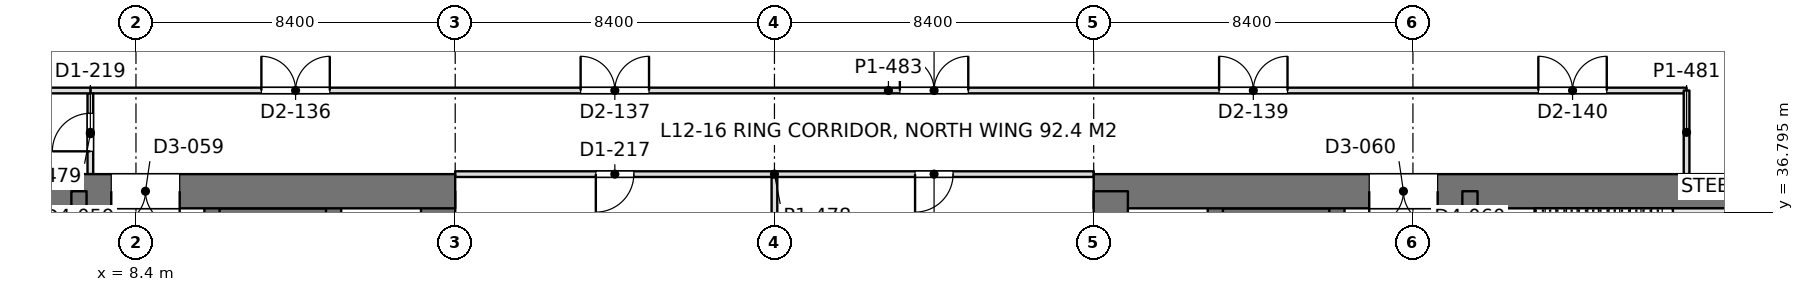
"""IFC4 building model, lengths in metres.
Left out: names, types, materials, properties, quantities, classifications, styles, units other than length and angle.
Written with IfcOpenShell. Run it as: python <this file> out.ifc"""

import sys

from ifc_helpers import new_model, si_unit, direction, frame, frame_2d, origin, place, context, subcontext, project, spatial, rectangle, extrude, element, fill, save


model = new_model("IFC4")
c1 = context("Model", 3, precision=1e-05, world=origin(), true_north=direction((0.0, 1.0)))
c2 = subcontext(c1, "Body", "Model", "MODEL_VIEW")
j1 = project(units=[si_unit("LENGTHUNIT", "METRE"), si_unit("PLANEANGLEUNIT", "RADIAN")], contexts=[c1])
p1 = place(None, origin())
s1 = spatial("IfcSite", under=j1, at=p1, CompositionType="ELEMENT")
p2 = place(p1, origin())
s2 = spatial("IfcBuilding", under=s1, at=p2, CompositionType="ELEMENT")
p3 = place(p2, frame((0.0, 0.0, 54.9)))
s3 = spatial("IfcBuildingStorey", under=s2, at=p3, CompositionType="ELEMENT", Elevation=54.9)
p4 = place(p3, frame((-1.2, 37.35, 0.0), z_axis=(0.0, 0.0, 1.0), x_axis=(1.0, 0.0, 0.0)))
e1 = element("IfcWall", 1, at=p4, inside=s3, PredefinedType="SHEAR", context=c2, shape_type="SweptSolid", body=[
    extrude(rectangle(XDim=18.0, YDim=0.9, at=frame_2d((9.0, 0.0))), origin(), (0.0, 0.0, 1.0), 4.5),
])
p5 = place(p4, frame((8.95, 0.0, 0.0)))
e2 = element("IfcOpeningElement", 2, at=p5, cuts=e1, PredefinedType="OPENING", context=c2, shape_type="SweptSolid", body=[
    extrude(rectangle(XDim=1.8, YDim=2.4, at=frame_2d((0.9, 1.2))), frame((0.0, 0.46, 0.0), z_axis=(0.0, -1.0, 0.0), x_axis=(1.0, 0.0, 0.0)), (0.0, 0.0, 1.0), 0.92),
])
p6 = place(p3, frame((16.35, 13.05, 0.0), z_axis=(0.0, 0.0, 1.0), x_axis=(0.0, 1.0, 0.0)))
e3 = element("IfcWall", 3, at=p6, inside=s3, PredefinedType="SHEAR", context=c2, shape_type="SweptSolid", body=[
    extrude(rectangle(XDim=24.3, YDim=0.9, at=frame_2d((12.15, 0.0))), origin(), (0.0, 0.0, 1.0), 4.5),
])
p7 = place(p3, frame((6.9, 13.05, 0.0), z_axis=(0.0, 0.0, 1.0), x_axis=(0.0, 1.0, 0.0)))
e4 = element("IfcWall", 4, at=p7, inside=s3, PredefinedType="SHEAR", context=c2, shape_type="SweptSolid", body=[
    extrude(rectangle(XDim=24.3, YDim=0.4, at=frame_2d((12.15, 0.0))), origin(), (0.0, 0.0, 1.0), 4.5),
])
p8 = place(p7, frame((1.3, 0.0, 0.0)))
e5 = element("IfcOpeningElement", 5, at=p8, cuts=e4, PredefinedType="OPENING", context=c2, shape_type="SweptSolid", body=[
    extrude(rectangle(XDim=1.0, YDim=2.2, at=frame_2d((0.5, 1.1))), frame((0.0, 0.21, 0.0), z_axis=(0.0, -1.0, 0.0), x_axis=(1.0, 0.0, 0.0)), (0.0, 0.0, 1.0), 0.42),
])
p9 = place(p7, frame((22.0, 0.0, 0.0)))
e6 = element("IfcOpeningElement", 6, at=p9, cuts=e4, PredefinedType="OPENING", context=c2, shape_type="SweptSolid", body=[
    extrude(rectangle(XDim=1.0, YDim=2.2, at=frame_2d((0.5, 1.1))), frame((0.0, 0.21, 0.0), z_axis=(0.0, -1.0, 0.0), x_axis=(1.0, 0.0, 0.0)), (0.0, 0.0, 1.0), 0.42),
])
p10 = place(p7, frame((5.55, 0.0, 0.0)))
e7 = element("IfcOpeningElement", 7, at=p10, cuts=e4, PredefinedType="OPENING", context=c2, shape_type="SweptSolid", body=[
    extrude(rectangle(XDim=1.0, YDim=2.2, at=frame_2d((0.5, 1.1))), frame((0.0, 0.21, 0.0), z_axis=(0.0, -1.0, 0.0), x_axis=(1.0, 0.0, 0.0)), (0.0, 0.0, 1.0), 0.42),
])
p11 = place(p7, frame((9.55, 0.0, 0.0)))
e8 = element("IfcOpeningElement", 8, at=p11, cuts=e4, PredefinedType="OPENING", context=c2, shape_type="SweptSolid", body=[
    extrude(rectangle(XDim=1.0, YDim=2.2, at=frame_2d((0.5, 1.1))), frame((0.0, 0.21, 0.0), z_axis=(0.0, -1.0, 0.0), x_axis=(1.0, 0.0, 0.0)), (0.0, 0.0, 1.0), 0.42),
])
p12 = place(p7, frame((12.8, 0.0, 0.0)))
e9 = element("IfcOpeningElement", 9, at=p12, cuts=e4, PredefinedType="OPENING", context=c2, shape_type="SweptSolid", body=[
    extrude(rectangle(XDim=1.1, YDim=2.2, at=frame_2d((0.55, 1.1))), frame((0.0, 0.21, 0.0), z_axis=(0.0, -1.0, 0.0), x_axis=(1.0, 0.0, 0.0)), (0.0, 0.0, 1.0), 0.42),
])
p13 = place(p7, frame((15.538, 0.0, 0.0)))
e10 = element("IfcOpeningElement", 10, at=p13, cuts=e4, PredefinedType="OPENING", context=c2, shape_type="SweptSolid", body=[
    extrude(rectangle(XDim=1.1, YDim=2.2, at=frame_2d((0.55, 1.1))), frame((0.0, 0.21, 0.0), z_axis=(0.0, -1.0, 0.0), x_axis=(1.0, 0.0, 0.0)), (0.0, 0.0, 1.0), 0.42),
])
p14 = place(p7, frame((18.262, 0.0, 0.0)))
e11 = element("IfcOpeningElement", 11, at=p14, cuts=e4, PredefinedType="OPENING", context=c2, shape_type="SweptSolid", body=[
    extrude(rectangle(XDim=1.1, YDim=2.2, at=frame_2d((0.55, 1.1))), frame((0.0, 0.21, 0.0), z_axis=(0.0, -1.0, 0.0), x_axis=(1.0, 0.0, 0.0)), (0.0, 0.0, 1.0), 0.42),
])
p15 = place(p3, frame((10.4, 13.05, 0.0), z_axis=(0.0, 0.0, 1.0), x_axis=(0.0, 1.0, 0.0)))
e12 = element("IfcWall", 12, at=p15, inside=s3, PredefinedType="SHEAR", context=c2, shape_type="SweptSolid", body=[
    extrude(rectangle(XDim=24.3, YDim=0.4, at=frame_2d((12.15, 0.0))), origin(), (0.0, 0.0, 1.0), 4.5),
])
p16 = place(p15, frame((1.5, 0.0, 0.0)))
e13 = element("IfcOpeningElement", 13, at=p16, cuts=e12, PredefinedType="OPENING", context=c2, shape_type="SweptSolid", body=[
    extrude(rectangle(XDim=1.1, YDim=2.2, at=frame_2d((0.55, 1.1))), frame((0.0, 0.21, 0.0), z_axis=(0.0, -1.0, 0.0), x_axis=(1.0, 0.0, 0.0)), (0.0, 0.0, 1.0), 0.42),
])
p17 = place(p15, frame((4.35, 0.0, 0.0)))
e14 = element("IfcOpeningElement", 14, at=p17, cuts=e12, PredefinedType="OPENING", context=c2, shape_type="SweptSolid", body=[
    extrude(rectangle(XDim=1.1, YDim=2.2, at=frame_2d((0.55, 1.1))), frame((0.0, 0.21, 0.0), z_axis=(0.0, -1.0, 0.0), x_axis=(1.0, 0.0, 0.0)), (0.0, 0.0, 1.0), 0.42),
])
p18 = place(p15, frame((7.2, 0.0, 0.0)))
e15 = element("IfcOpeningElement", 15, at=p18, cuts=e12, PredefinedType="OPENING", context=c2, shape_type="SweptSolid", body=[
    extrude(rectangle(XDim=1.1, YDim=2.2, at=frame_2d((0.55, 1.1))), frame((0.0, 0.21, 0.0), z_axis=(0.0, -1.0, 0.0), x_axis=(1.0, 0.0, 0.0)), (0.0, 0.0, 1.0), 0.42),
])
p19 = place(p15, frame((21.45, 0.0, 0.0)))
e16 = element("IfcOpeningElement", 16, at=p19, cuts=e12, PredefinedType="OPENING", context=c2, shape_type="SweptSolid", body=[
    extrude(rectangle(XDim=1.1, YDim=2.2, at=frame_2d((0.55, 1.1))), frame((0.0, 0.21, 0.0), z_axis=(0.0, -1.0, 0.0), x_axis=(1.0, 0.0, 0.0)), (0.0, 0.0, 1.0), 0.42),
])
p20 = place(p3, frame((13.6, 13.05, 0.0), z_axis=(0.0, 0.0, 1.0), x_axis=(0.0, 1.0, 0.0)))
e17 = element("IfcWall", 17, at=p20, inside=s3, PredefinedType="SHEAR", context=c2, shape_type="SweptSolid", body=[
    extrude(rectangle(XDim=24.3, YDim=0.4, at=frame_2d((12.15, 0.0))), origin(), (0.0, 0.0, 1.0), 4.5),
])
p21 = place(p3, frame((10.4, 36.625, 0.0), z_axis=(0.0, 0.0, 1.0), x_axis=(1.0, 0.0, 0.0)))
e18 = element("IfcWall", 18, at=p21, inside=s3, PredefinedType="SHEAR", context=c2, shape_type="SweptSolid", body=[
    extrude(rectangle(XDim=3.2, YDim=0.55, at=frame_2d((1.6, 0.0))), origin(), (0.0, 0.0, 1.0), 4.5),
])
p22 = place(p3, frame((33.6, 37.35, 0.0), z_axis=(0.0, 0.0, 1.0), x_axis=(1.0, 0.0, 0.0)))
e19 = element("IfcWall", 19, at=p22, inside=s3, PredefinedType="SHEAR", context=c2, shape_type="SweptSolid", body=[
    extrude(rectangle(XDim=18.0, YDim=0.9, at=frame_2d((9.0, 0.0))), origin(), (0.0, 0.0, 1.0), 4.5),
])
p23 = place(p22, frame((7.25, 0.0, 0.0)))
e20 = element("IfcOpeningElement", 20, at=p23, cuts=e19, PredefinedType="OPENING", context=c2, shape_type="SweptSolid", body=[
    extrude(rectangle(XDim=1.8, YDim=2.4, at=frame_2d((0.9, 1.2))), frame((0.0, 0.46, 0.0), z_axis=(0.0, -1.0, 0.0), x_axis=(1.0, 0.0, 0.0)), (0.0, 0.0, 1.0), 0.92),
])
p24 = place(p3, frame((34.05, 13.05, 0.0), z_axis=(0.0, 0.0, 1.0), x_axis=(0.0, 1.0, 0.0)))
e21 = element("IfcWall", 21, at=p24, inside=s3, PredefinedType="SHEAR", context=c2, shape_type="SweptSolid", body=[
    extrude(rectangle(XDim=24.3, YDim=0.9, at=frame_2d((12.15, 0.0))), origin(), (0.0, 0.0, 1.0), 4.5),
])
p25 = place(p3, frame((43.5, 13.05, 0.0), z_axis=(0.0, 0.0, 1.0), x_axis=(0.0, 1.0, 0.0)))
e22 = element("IfcWall", 22, at=p25, inside=s3, PredefinedType="SHEAR", context=c2, shape_type="SweptSolid", body=[
    extrude(rectangle(XDim=24.3, YDim=0.4, at=frame_2d((12.15, 0.0))), origin(), (0.0, 0.0, 1.0), 4.5),
])
p26 = place(p25, frame((1.3, 0.0, 0.0)))
e23 = element("IfcOpeningElement", 23, at=p26, cuts=e22, PredefinedType="OPENING", context=c2, shape_type="SweptSolid", body=[
    extrude(rectangle(XDim=1.0, YDim=2.2, at=frame_2d((0.5, 1.1))), frame((0.0, 0.21, 0.0), z_axis=(0.0, -1.0, 0.0), x_axis=(1.0, 0.0, 0.0)), (0.0, 0.0, 1.0), 0.42),
])
p27 = place(p25, frame((22.0, 0.0, 0.0)))
e24 = element("IfcOpeningElement", 24, at=p27, cuts=e22, PredefinedType="OPENING", context=c2, shape_type="SweptSolid", body=[
    extrude(rectangle(XDim=1.0, YDim=2.2, at=frame_2d((0.5, 1.1))), frame((0.0, 0.21, 0.0), z_axis=(0.0, -1.0, 0.0), x_axis=(1.0, 0.0, 0.0)), (0.0, 0.0, 1.0), 0.42),
])
p28 = place(p25, frame((5.55, 0.0, 0.0)))
e25 = element("IfcOpeningElement", 25, at=p28, cuts=e22, PredefinedType="OPENING", context=c2, shape_type="SweptSolid", body=[
    extrude(rectangle(XDim=1.0, YDim=2.2, at=frame_2d((0.5, 1.1))), frame((0.0, 0.21, 0.0), z_axis=(0.0, -1.0, 0.0), x_axis=(1.0, 0.0, 0.0)), (0.0, 0.0, 1.0), 0.42),
])
p29 = place(p25, frame((9.55, 0.0, 0.0)))
e26 = element("IfcOpeningElement", 26, at=p29, cuts=e22, PredefinedType="OPENING", context=c2, shape_type="SweptSolid", body=[
    extrude(rectangle(XDim=1.0, YDim=2.2, at=frame_2d((0.5, 1.1))), frame((0.0, 0.21, 0.0), z_axis=(0.0, -1.0, 0.0), x_axis=(1.0, 0.0, 0.0)), (0.0, 0.0, 1.0), 0.42),
])
p30 = place(p25, frame((12.8, 0.0, 0.0)))
e27 = element("IfcOpeningElement", 27, at=p30, cuts=e22, PredefinedType="OPENING", context=c2, shape_type="SweptSolid", body=[
    extrude(rectangle(XDim=1.1, YDim=2.2, at=frame_2d((0.55, 1.1))), frame((0.0, 0.21, 0.0), z_axis=(0.0, -1.0, 0.0), x_axis=(1.0, 0.0, 0.0)), (0.0, 0.0, 1.0), 0.42),
])
p31 = place(p25, frame((15.538, 0.0, 0.0)))
e28 = element("IfcOpeningElement", 28, at=p31, cuts=e22, PredefinedType="OPENING", context=c2, shape_type="SweptSolid", body=[
    extrude(rectangle(XDim=1.1, YDim=2.2, at=frame_2d((0.55, 1.1))), frame((0.0, 0.21, 0.0), z_axis=(0.0, -1.0, 0.0), x_axis=(1.0, 0.0, 0.0)), (0.0, 0.0, 1.0), 0.42),
])
p32 = place(p25, frame((18.262, 0.0, 0.0)))
e29 = element("IfcOpeningElement", 29, at=p32, cuts=e22, PredefinedType="OPENING", context=c2, shape_type="SweptSolid", body=[
    extrude(rectangle(XDim=1.1, YDim=2.2, at=frame_2d((0.55, 1.1))), frame((0.0, 0.21, 0.0), z_axis=(0.0, -1.0, 0.0), x_axis=(1.0, 0.0, 0.0)), (0.0, 0.0, 1.0), 0.42),
])
p33 = place(p3, frame((40.0, 13.05, 0.0), z_axis=(0.0, 0.0, 1.0), x_axis=(0.0, 1.0, 0.0)))
e30 = element("IfcWall", 30, at=p33, inside=s3, PredefinedType="SHEAR", context=c2, shape_type="SweptSolid", body=[
    extrude(rectangle(XDim=24.3, YDim=0.4, at=frame_2d((12.15, 0.0))), origin(), (0.0, 0.0, 1.0), 4.5),
])
p34 = place(p33, frame((1.5, 0.0, 0.0)))
e31 = element("IfcOpeningElement", 31, at=p34, cuts=e30, PredefinedType="OPENING", context=c2, shape_type="SweptSolid", body=[
    extrude(rectangle(XDim=1.1, YDim=2.2, at=frame_2d((0.55, 1.1))), frame((0.0, 0.21, 0.0), z_axis=(0.0, -1.0, 0.0), x_axis=(1.0, 0.0, 0.0)), (0.0, 0.0, 1.0), 0.42),
])
p35 = place(p33, frame((4.35, 0.0, 0.0)))
e32 = element("IfcOpeningElement", 32, at=p35, cuts=e30, PredefinedType="OPENING", context=c2, shape_type="SweptSolid", body=[
    extrude(rectangle(XDim=1.1, YDim=2.2, at=frame_2d((0.55, 1.1))), frame((0.0, 0.21, 0.0), z_axis=(0.0, -1.0, 0.0), x_axis=(1.0, 0.0, 0.0)), (0.0, 0.0, 1.0), 0.42),
])
p36 = place(p33, frame((7.2, 0.0, 0.0)))
e33 = element("IfcOpeningElement", 33, at=p36, cuts=e30, PredefinedType="OPENING", context=c2, shape_type="SweptSolid", body=[
    extrude(rectangle(XDim=1.1, YDim=2.2, at=frame_2d((0.55, 1.1))), frame((0.0, 0.21, 0.0), z_axis=(0.0, -1.0, 0.0), x_axis=(1.0, 0.0, 0.0)), (0.0, 0.0, 1.0), 0.42),
])
p37 = place(p33, frame((21.45, 0.0, 0.0)))
e34 = element("IfcOpeningElement", 34, at=p37, cuts=e30, PredefinedType="OPENING", context=c2, shape_type="SweptSolid", body=[
    extrude(rectangle(XDim=1.1, YDim=2.2, at=frame_2d((0.55, 1.1))), frame((0.0, 0.21, 0.0), z_axis=(0.0, -1.0, 0.0), x_axis=(1.0, 0.0, 0.0)), (0.0, 0.0, 1.0), 0.42),
])
p38 = place(p3, frame((36.8, 13.05, 0.0), z_axis=(0.0, 0.0, 1.0), x_axis=(0.0, 1.0, 0.0)))
e35 = element("IfcWall", 35, at=p38, inside=s3, PredefinedType="SHEAR", context=c2, shape_type="SweptSolid", body=[
    extrude(rectangle(XDim=24.3, YDim=0.4, at=frame_2d((12.15, 0.0))), origin(), (0.0, 0.0, 1.0), 4.5),
])
p39 = place(p3, frame((40.0, 36.625, 0.0), z_axis=(0.0, 0.0, 1.0), x_axis=(-1.0, 0.0, 0.0)))
e36 = element("IfcWall", 36, at=p39, inside=s3, PredefinedType="SHEAR", context=c2, shape_type="SweptSolid", body=[
    extrude(rectangle(XDim=3.2, YDim=0.55, at=frame_2d((1.6, 0.0))), origin(), (0.0, 0.0, 1.0), 4.5),
])
p40 = place(p3, frame((7.198, 40.0, 0.0), z_axis=(0.0, 0.0, 1.0), x_axis=(1.0, 0.0, 0.0)))
e37 = element("IfcWall", 37, at=p40, inside=s3, PredefinedType="PARTITIONING", context=c2, shape_type="SweptSolid", body=[
    extrude(rectangle(XDim=42.002, YDim=0.15, at=frame_2d((21.001, 0.0))), origin(), (0.0, 0.0, 1.0), 3.74),
])
p41 = place(p40, frame((4.502, 0.0, 0.0)))
e38 = element("IfcOpeningElement", 38, at=p41, cuts=e37, PredefinedType="OPENING", context=c2, shape_type="SweptSolid", body=[
    extrude(rectangle(XDim=1.8, YDim=2.2, at=frame_2d((0.9, 1.1))), frame((0.0, 0.085, 0.0), z_axis=(0.0, -1.0, 0.0), x_axis=(1.0, 0.0, 0.0)), (0.0, 0.0, 1.0), 0.17),
])
p42 = place(p40, frame((12.902, 0.0, 0.0)))
e39 = element("IfcOpeningElement", 39, at=p42, cuts=e37, PredefinedType="OPENING", context=c2, shape_type="SweptSolid", body=[
    extrude(rectangle(XDim=1.8, YDim=2.2, at=frame_2d((0.9, 1.1))), frame((0.0, 0.085, 0.0), z_axis=(0.0, -1.0, 0.0), x_axis=(1.0, 0.0, 0.0)), (0.0, 0.0, 1.0), 0.17),
])
p43 = place(p40, frame((21.302, 0.0, 0.0)))
e40 = element("IfcOpeningElement", 40, at=p43, cuts=e37, PredefinedType="OPENING", context=c2, shape_type="SweptSolid", body=[
    extrude(rectangle(XDim=1.8, YDim=2.2, at=frame_2d((0.9, 1.1))), frame((0.0, 0.085, 0.0), z_axis=(0.0, -1.0, 0.0), x_axis=(1.0, 0.0, 0.0)), (0.0, 0.0, 1.0), 0.17),
])
p44 = place(p40, frame((29.702, 0.0, 0.0)))
e41 = element("IfcOpeningElement", 41, at=p44, cuts=e37, PredefinedType="OPENING", context=c2, shape_type="SweptSolid", body=[
    extrude(rectangle(XDim=1.8, YDim=2.2, at=frame_2d((0.9, 1.1))), frame((0.0, 0.085, 0.0), z_axis=(0.0, -1.0, 0.0), x_axis=(1.0, 0.0, 0.0)), (0.0, 0.0, 1.0), 0.17),
])
p45 = place(p40, frame((38.102, 0.0, 0.0)))
e42 = element("IfcOpeningElement", 42, at=p45, cuts=e37, PredefinedType="OPENING", context=c2, shape_type="SweptSolid", body=[
    extrude(rectangle(XDim=1.8, YDim=2.2, at=frame_2d((0.9, 1.1))), frame((0.0, 0.085, 0.0), z_axis=(0.0, -1.0, 0.0), x_axis=(1.0, 0.0, 0.0)), (0.0, 0.0, 1.0), 0.17),
])
p46 = place(p3, frame((7.2, 37.8, 0.0), z_axis=(0.0, 0.0, 1.0), x_axis=(0.0, 1.0, 0.0)))
e43 = element("IfcWall", 43, at=p46, inside=s3, PredefinedType="PARTITIONING", context=c2, shape_type="SweptSolid", body=[
    extrude(rectangle(XDim=2.126, YDim=0.15, at=frame_2d((1.063, 0.0))), origin(), (0.0, 0.0, 1.0), 4.34),
])
p47 = place(p46, frame((0.6, 0.0, 0.0)))
e44 = element("IfcOpeningElement", 44, at=p47, cuts=e43, PredefinedType="OPENING", context=c2, shape_type="SweptSolid", body=[
    extrude(rectangle(XDim=1.0, YDim=2.2, at=frame_2d((0.5, 1.1))), frame((0.0, 0.085, 0.0), z_axis=(0.0, -1.0, 0.0), x_axis=(1.0, 0.0, 0.0)), (0.0, 0.0, 1.0), 0.17),
])
p48 = place(p3, frame((49.2, 37.8, 0.0), z_axis=(0.0, 0.0, 1.0), x_axis=(0.0, 1.0, 0.0)))
e45 = element("IfcWall", 45, at=p48, inside=s3, PredefinedType="PARTITIONING", context=c2, shape_type="SweptSolid", body=[
    extrude(rectangle(XDim=2.2, YDim=0.15, at=frame_2d((1.1, 0.0))), origin(), (0.0, 0.0, 1.0), 4.34),
])
p49 = place(p3, frame((1.2, 40.0, 0.0), z_axis=(0.0, 0.0, 1.0), x_axis=(1.0, 0.0, 0.0)))
e46 = element("IfcWall", 46, at=p49, inside=s3, PredefinedType="PARTITIONING", context=c2, shape_type="SweptSolid", body=[
    extrude(rectangle(XDim=6.002, YDim=0.15, at=frame_2d((3.001, 0.0))), origin(), (0.0, 0.0, 1.0), 3.98),
])
p50 = place(p3, frame((25.2, 34.199, 0.0), z_axis=(0.0, 0.0, 1.0), x_axis=(0.0, 1.0, 0.0)))
e47 = element("IfcWall", 47, at=p50, inside=s3, PredefinedType="PARTITIONING", context=c2, shape_type="SweptSolid", body=[
    extrude(rectangle(XDim=3.527, YDim=0.15, at=frame_2d((1.764, 0.0))), origin(), (0.0, 0.0, 1.0), 3.74),
])
p51 = place(p3, frame((16.798, 37.8, 0.0), z_axis=(0.0, 0.0, 1.0), x_axis=(1.0, 0.0, 0.0)))
e48 = element("IfcWall", 48, at=p51, inside=s3, PredefinedType="PARTITIONING", context=c2, shape_type="SweptSolid", body=[
    extrude(rectangle(XDim=16.804, YDim=0.15, at=frame_2d((8.402, 0.0))), origin(), (0.0, 0.0, 1.0), 3.74),
])
p52 = place(p51, frame((3.702, 0.0, 0.0)))
e49 = element("IfcOpeningElement", 49, at=p52, cuts=e48, PredefinedType="OPENING", context=c2, shape_type="SweptSolid", body=[
    extrude(rectangle(XDim=1.0, YDim=2.2, at=frame_2d((0.5, 1.1))), frame((0.0, 0.085, 0.0), z_axis=(0.0, -1.0, 0.0), x_axis=(1.0, 0.0, 0.0)), (0.0, 0.0, 1.0), 0.17),
])
p53 = place(p51, frame((12.102, 0.0, 0.0)))
e50 = element("IfcOpeningElement", 50, at=p53, cuts=e48, PredefinedType="OPENING", context=c2, shape_type="SweptSolid", body=[
    extrude(rectangle(XDim=1.0, YDim=2.2, at=frame_2d((0.5, 1.1))), frame((0.0, 0.085, 0.0), z_axis=(0.0, -1.0, 0.0), x_axis=(1.0, 0.0, 0.0)), (0.0, 0.0, 1.0), 0.17),
])
p54 = place(p5, frame((1.8, 0.0, 0.0), z_axis=(0.0, 0.0, 1.0), x_axis=(-1.0, 0.0, 0.0)))
e51 = element("IfcDoor", 51, at=p54, inside=s3, OperationType="DOUBLE_DOOR_SINGLE_SWING", PredefinedType="DOOR", context=c2, shape_type="SweptSolid", body=[
    extrude(rectangle(XDim=1.8, YDim=2.4, at=frame_2d((0.9, 1.2))), frame((0.0, 0.025, 0.0), z_axis=(0.0, -1.0, 0.0), x_axis=(1.0, 0.0, 0.0)), (0.0, 0.0, 1.0), 0.05),
])
fill(e2, e51)
p55 = place(p23, frame((1.8, 0.0, 0.0), z_axis=(0.0, 0.0, 1.0), x_axis=(-1.0, 0.0, 0.0)))
e52 = element("IfcDoor", 52, at=p55, inside=s3, OperationType="DOUBLE_DOOR_SINGLE_SWING", PredefinedType="DOOR", context=c2, shape_type="SweptSolid", body=[
    extrude(rectangle(XDim=1.8, YDim=2.4, at=frame_2d((0.9, 1.2))), frame((0.0, 0.025, 0.0), z_axis=(0.0, -1.0, 0.0), x_axis=(1.0, 0.0, 0.0)), (0.0, 0.0, 1.0), 0.05),
])
fill(e20, e52)
p56 = place(p41, origin())
e53 = element("IfcDoor", 53, at=p56, inside=s3, OperationType="DOUBLE_DOOR_SINGLE_SWING", PredefinedType="DOOR", context=c2, shape_type="SweptSolid", body=[
    extrude(rectangle(XDim=1.8, YDim=2.2, at=frame_2d((0.9, 1.1))), frame((0.0, 0.025, 0.0), z_axis=(0.0, -1.0, 0.0), x_axis=(1.0, 0.0, 0.0)), (0.0, 0.0, 1.0), 0.05),
])
fill(e38, e53)
p57 = place(p42, origin())
e54 = element("IfcDoor", 54, at=p57, inside=s3, OperationType="DOUBLE_DOOR_SINGLE_SWING", PredefinedType="DOOR", context=c2, shape_type="SweptSolid", body=[
    extrude(rectangle(XDim=1.8, YDim=2.2, at=frame_2d((0.9, 1.1))), frame((0.0, 0.025, 0.0), z_axis=(0.0, -1.0, 0.0), x_axis=(1.0, 0.0, 0.0)), (0.0, 0.0, 1.0), 0.05),
])
fill(e39, e54)
p58 = place(p43, origin())
e55 = element("IfcDoor", 55, at=p58, inside=s3, OperationType="DOUBLE_DOOR_SINGLE_SWING", PredefinedType="DOOR", context=c2, shape_type="SweptSolid", body=[
    extrude(rectangle(XDim=1.8, YDim=2.2, at=frame_2d((0.9, 1.1))), frame((0.0, 0.025, 0.0), z_axis=(0.0, -1.0, 0.0), x_axis=(1.0, 0.0, 0.0)), (0.0, 0.0, 1.0), 0.05),
])
fill(e40, e55)
p59 = place(p44, origin())
e56 = element("IfcDoor", 56, at=p59, inside=s3, OperationType="DOUBLE_DOOR_SINGLE_SWING", PredefinedType="DOOR", context=c2, shape_type="SweptSolid", body=[
    extrude(rectangle(XDim=1.8, YDim=2.2, at=frame_2d((0.9, 1.1))), frame((0.0, 0.025, 0.0), z_axis=(0.0, -1.0, 0.0), x_axis=(1.0, 0.0, 0.0)), (0.0, 0.0, 1.0), 0.05),
])
fill(e41, e56)
p60 = place(p45, origin())
e57 = element("IfcDoor", 57, at=p60, inside=s3, OperationType="DOUBLE_DOOR_SINGLE_SWING", PredefinedType="DOOR", context=c2, shape_type="SweptSolid", body=[
    extrude(rectangle(XDim=1.8, YDim=2.2, at=frame_2d((0.9, 1.1))), frame((0.0, 0.025, 0.0), z_axis=(0.0, -1.0, 0.0), x_axis=(1.0, 0.0, 0.0)), (0.0, 0.0, 1.0), 0.05),
])
fill(e42, e57)
p61 = place(p47, origin())
e58 = element("IfcDoor", 58, at=p61, inside=s3, OperationType="SINGLE_SWING_LEFT", PredefinedType="DOOR", context=c2, shape_type="SweptSolid", body=[
    extrude(rectangle(XDim=1.0, YDim=2.2, at=frame_2d((0.5, 1.1))), frame((0.0, 0.025, 0.0), z_axis=(0.0, -1.0, 0.0), x_axis=(1.0, 0.0, 0.0)), (0.0, 0.0, 1.0), 0.05),
])
fill(e44, e58)
p62 = place(p52, frame((1.0, 0.0, 0.0), z_axis=(0.0, 0.0, 1.0), x_axis=(-1.0, 0.0, 0.0)))
e59 = element("IfcDoor", 59, at=p62, inside=s3, OperationType="SINGLE_SWING_RIGHT", PredefinedType="DOOR", context=c2, shape_type="SweptSolid", body=[
    extrude(rectangle(XDim=1.0, YDim=2.2, at=frame_2d((0.5, 1.1))), frame((0.0, 0.025, 0.0), z_axis=(0.0, -1.0, 0.0), x_axis=(1.0, 0.0, 0.0)), (0.0, 0.0, 1.0), 0.05),
])
fill(e49, e59)
p63 = place(p53, frame((1.0, 0.0, 0.0), z_axis=(0.0, 0.0, 1.0), x_axis=(-1.0, 0.0, 0.0)))
e60 = element("IfcDoor", 60, at=p63, inside=s3, OperationType="SINGLE_SWING_RIGHT", PredefinedType="DOOR", context=c2, shape_type="SweptSolid", body=[
    extrude(rectangle(XDim=1.0, YDim=2.2, at=frame_2d((0.5, 1.1))), frame((0.0, 0.025, 0.0), z_axis=(0.0, -1.0, 0.0), x_axis=(1.0, 0.0, 0.0)), (0.0, 0.0, 1.0), 0.05),
])
fill(e50, e60)
save(model, sys.argv[1])
